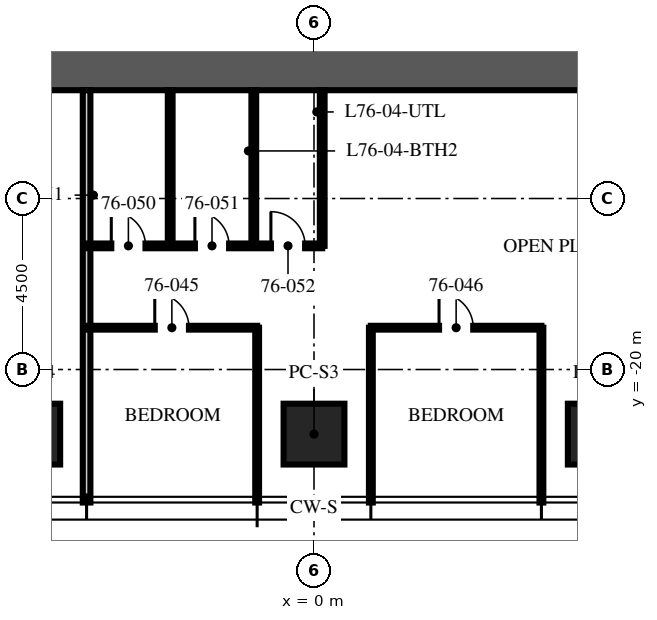
"""IFC4 building model, lengths in metres.
Left out: names, types, materials, properties, quantities, classifications, styles, units other than length and angle.
Written with IfcOpenShell. Run it as: python <this file> out.ifc"""

import sys

from ifc_helpers import new_model, si_unit, direction, frame, frame_2d, origin, origin_2d, place, context, subcontext, project, spatial, rectangle, extrude, element, fill, save


model = new_model("IFC4")
c1 = context("Model", 3, precision=1e-05, world=origin(), true_north=direction((0.0, 1.0)))
c2 = subcontext(c1, "Body", "Model", "MODEL_VIEW")
j1 = project(units=[si_unit("LENGTHUNIT", "METRE"), si_unit("PLANEANGLEUNIT", "RADIAN")], contexts=[c1])
p1 = place(None, origin())
s1 = spatial("IfcSite", under=j1, at=p1, CompositionType="ELEMENT")
p2 = place(p1, origin())
s2 = spatial("IfcBuilding", under=s1, at=p2, CompositionType="ELEMENT")
p3 = place(p2, frame((0.0, 0.0, 304.5)))
s3 = spatial("IfcBuildingStorey", under=s2, at=p3, CompositionType="ELEMENT", Elevation=304.5)
p4 = place(p3, frame((-15.5, -12.0, -0.25), z_axis=(0.0, 0.0, 1.0), x_axis=(1.0, 0.0, 0.0)))
e1 = element("IfcWall", 1, at=p4, inside=s3, PredefinedType="SHEAR", context=c2, shape_type="SweptSolid", body=[
    extrude(rectangle(XDim=31.0, YDim=1.3, at=frame_2d((15.5, 0.0))), origin(), (0.0, 0.0, 1.0), 3.75),
])
for number, where, z_axis, x_axis in (
    (2, (7.48, -21.7, 0.0), (0.0, 0.0, 1.0), (1.0, 0.0, 0.0)),
    (3, (0.0, -21.7, 0.0), (0.0, 0.0, 1.0), (1.0, 0.0, 0.0)),
    (4, (-7.48, -21.7, 0.0), (0.0, 0.0, 1.0), (1.0, 0.0, 0.0)),
):
    element("IfcColumn", number, at=place(p3, frame(where, z_axis=z_axis, x_axis=x_axis)), inside=s3, PredefinedType="COLUMN", context=c2, shape_type="SweptSolid", body=[
        extrude(rectangle(XDim=1.6, YDim=1.6, at=origin_2d()), origin(), (0.0, 0.0, 1.0), 3.75),
    ])
p5 = place(p3, frame((-5.984, -12.65, 0.0), z_axis=(0.0, 0.0, 1.0), x_axis=(0.0, -1.0, 0.0)))
e5 = element("IfcWall", 5, at=p5, inside=s3, PredefinedType="PARTITIONING", context=c2, shape_type="SweptSolid", body=[
    extrude(rectangle(XDim=10.85, YDim=0.2, at=frame_2d((5.425, 0.0))), origin(), (0.0, 0.0, 1.0), 3.01),
])
for number, where, z_axis, x_axis in (
    (6, (-1.496, -18.9, 0.0), (0.0, 0.0, 1.0), (0.0, -1.0, 0.0)),
    (7, (1.496, -18.9, 0.0), (0.0, 0.0, 1.0), (0.0, -1.0, 0.0)),
    (8, (5.984, -18.9, 0.0), (0.0, 0.0, 1.0), (0.0, -1.0, 0.0)),
):
    element("IfcWall", number, at=place(p3, frame(where, z_axis=z_axis, x_axis=x_axis)), inside=s3, PredefinedType="PARTITIONING", context=c2, shape_type="SweptSolid", body=[
        extrude(rectangle(XDim=4.6, YDim=0.1, at=frame_2d((2.3, 0.0))), origin(), (0.0, 0.0, 1.0), 3.01),
    ])
p6 = place(p3, frame((-5.984, -18.9, 0.0), z_axis=(0.0, 0.0, 1.0), x_axis=(1.0, 0.0, 0.0)))
e9 = element("IfcWall", 9, at=p6, inside=s3, PredefinedType="PARTITIONING", context=c2, shape_type="SweptSolid", body=[
    extrude(rectangle(XDim=4.488, YDim=0.1, at=frame_2d((2.244, 0.0))), origin(), (0.0, 0.0, 1.0), 2.91),
])
p7 = place(p6, frame((1.794, 0.0, 0.0)))
e10 = element("IfcOpeningElement", 10, at=p7, cuts=e9, PredefinedType="OPENING", context=c2, shape_type="SweptSolid", body=[
    extrude(rectangle(XDim=0.9, YDim=2.1, at=frame_2d((0.45, 1.05))), frame((0.0, 0.06, 0.0), z_axis=(0.0, -1.0, 0.0), x_axis=(1.0, 0.0, 0.0)), (0.0, 0.0, 1.0), 0.12),
])
p8 = place(p3, frame((1.496, -18.9, 0.0), z_axis=(0.0, 0.0, 1.0), x_axis=(1.0, 0.0, 0.0)))
e11 = element("IfcWall", 11, at=p8, inside=s3, PredefinedType="PARTITIONING", context=c2, shape_type="SweptSolid", body=[
    extrude(rectangle(XDim=4.488, YDim=0.1, at=frame_2d((2.244, 0.0))), origin(), (0.0, 0.0, 1.0), 2.91),
])
p9 = place(p8, frame((1.794, 0.0, 0.0)))
e12 = element("IfcOpeningElement", 12, at=p9, cuts=e11, PredefinedType="OPENING", context=c2, shape_type="SweptSolid", body=[
    extrude(rectangle(XDim=0.9, YDim=2.1, at=frame_2d((0.45, 1.05))), frame((0.0, 0.06, 0.0), z_axis=(0.0, -1.0, 0.0), x_axis=(1.0, 0.0, 0.0)), (0.0, 0.0, 1.0), 0.12),
])
p10 = place(p3, frame((-5.984, -16.746, 0.0), z_axis=(0.0, 0.0, 1.0), x_axis=(1.0, 0.0, 0.0)))
e13 = element("IfcWall", 13, at=p10, inside=s3, PredefinedType="PARTITIONING", context=c2, shape_type="SweptSolid", body=[
    extrude(rectangle(XDim=6.2, YDim=0.125, at=frame_2d((3.1, 0.0))), origin(), (0.0, 0.0, 1.0), 2.9),
])
p11 = place(p10, frame((0.65, 0.0, 0.0)))
e14 = element("IfcOpeningElement", 14, at=p11, cuts=e13, PredefinedType="OPENING", context=c2, shape_type="SweptSolid", body=[
    extrude(rectangle(XDim=0.9, YDim=2.1, at=frame_2d((0.45, 1.05))), frame((0.0, 0.073, 0.0), z_axis=(0.0, -1.0, 0.0), x_axis=(1.0, 0.0, 0.0)), (0.0, 0.0, 1.0), 0.145),
])
p12 = place(p10, frame((2.85, 0.0, 0.0)))
e15 = element("IfcOpeningElement", 15, at=p12, cuts=e13, PredefinedType="OPENING", context=c2, shape_type="SweptSolid", body=[
    extrude(rectangle(XDim=0.9, YDim=2.1, at=frame_2d((0.45, 1.05))), frame((0.0, 0.073, 0.0), z_axis=(0.0, -1.0, 0.0), x_axis=(1.0, 0.0, 0.0)), (0.0, 0.0, 1.0), 0.145),
])
p13 = place(p10, frame((4.85, 0.0, 0.0)))
e16 = element("IfcOpeningElement", 16, at=p13, cuts=e13, PredefinedType="OPENING", context=c2, shape_type="SweptSolid", body=[
    extrude(rectangle(XDim=0.9, YDim=2.1, at=frame_2d((0.45, 1.05))), frame((0.0, 0.073, 0.0), z_axis=(0.0, -1.0, 0.0), x_axis=(1.0, 0.0, 0.0)), (0.0, 0.0, 1.0), 0.145),
])
p14 = place(p3, frame((-3.784, -12.65, 0.0), z_axis=(0.0, 0.0, 1.0), x_axis=(0.0, -1.0, 0.0)))
e17 = element("IfcWall", 17, at=p14, inside=s3, PredefinedType="PARTITIONING", context=c2, shape_type="SweptSolid", body=[
    extrude(rectangle(XDim=4.096, YDim=0.125, at=frame_2d((2.048, 0.0))), origin(), (0.0, 0.0, 1.0), 2.91),
])
for number, where, z_axis, x_axis in (
    (18, (-1.584, -12.65, 0.0), (0.0, 0.0, 1.0), (0.0, -1.0, 0.0)),
    (19, (0.216, -12.65, 0.0), (0.0, 0.0, 1.0), (0.0, -1.0, 0.0)),
):
    element("IfcWall", number, at=place(p3, frame(where, z_axis=z_axis, x_axis=x_axis)), inside=s3, PredefinedType="PARTITIONING", context=c2, shape_type="SweptSolid", body=[
        extrude(rectangle(XDim=4.096, YDim=0.125, at=frame_2d((2.048, 0.0))), origin(), (0.0, 0.0, 1.0), 3.5),
    ])
p15 = place(p7, origin())
e20 = element("IfcDoor", 20, at=p15, inside=s3, OperationType="SINGLE_SWING_LEFT", PredefinedType="DOOR", context=c2, shape_type="SweptSolid", body=[
    extrude(rectangle(XDim=0.9, YDim=2.1, at=frame_2d((0.45, 1.05))), frame((0.0, 0.025, 0.0), z_axis=(0.0, -1.0, 0.0), x_axis=(1.0, 0.0, 0.0)), (0.0, 0.0, 1.0), 0.05),
])
fill(e10, e20)
p16 = place(p9, origin())
e21 = element("IfcDoor", 21, at=p16, inside=s3, OperationType="SINGLE_SWING_LEFT", PredefinedType="DOOR", context=c2, shape_type="SweptSolid", body=[
    extrude(rectangle(XDim=0.9, YDim=2.1, at=frame_2d((0.45, 1.05))), frame((0.0, 0.025, 0.0), z_axis=(0.0, -1.0, 0.0), x_axis=(1.0, 0.0, 0.0)), (0.0, 0.0, 1.0), 0.05),
])
fill(e12, e21)
p17 = place(p11, origin())
e22 = element("IfcDoor", 22, at=p17, inside=s3, OperationType="SINGLE_SWING_LEFT", PredefinedType="DOOR", context=c2, shape_type="SweptSolid", body=[
    extrude(rectangle(XDim=0.9, YDim=2.1, at=frame_2d((0.45, 1.05))), frame((0.0, 0.025, 0.0), z_axis=(0.0, -1.0, 0.0), x_axis=(1.0, 0.0, 0.0)), (0.0, 0.0, 1.0), 0.05),
])
fill(e14, e22)
p18 = place(p12, origin())
e23 = element("IfcDoor", 23, at=p18, inside=s3, OperationType="SINGLE_SWING_LEFT", PredefinedType="DOOR", context=c2, shape_type="SweptSolid", body=[
    extrude(rectangle(XDim=0.9, YDim=2.1, at=frame_2d((0.45, 1.05))), frame((0.0, 0.025, 0.0), z_axis=(0.0, -1.0, 0.0), x_axis=(1.0, 0.0, 0.0)), (0.0, 0.0, 1.0), 0.05),
])
fill(e15, e23)
p19 = place(p13, origin())
e24 = element("IfcDoor", 24, at=p19, inside=s3, OperationType="SINGLE_SWING_LEFT", PredefinedType="DOOR", context=c2, shape_type="SweptSolid", body=[
    extrude(rectangle(XDim=0.9, YDim=2.1, at=frame_2d((0.45, 1.05))), frame((0.0, 0.025, 0.0), z_axis=(0.0, -1.0, 0.0), x_axis=(1.0, 0.0, 0.0)), (0.0, 0.0, 1.0), 0.05),
])
fill(e16, e24)
save(model, sys.argv[1])
